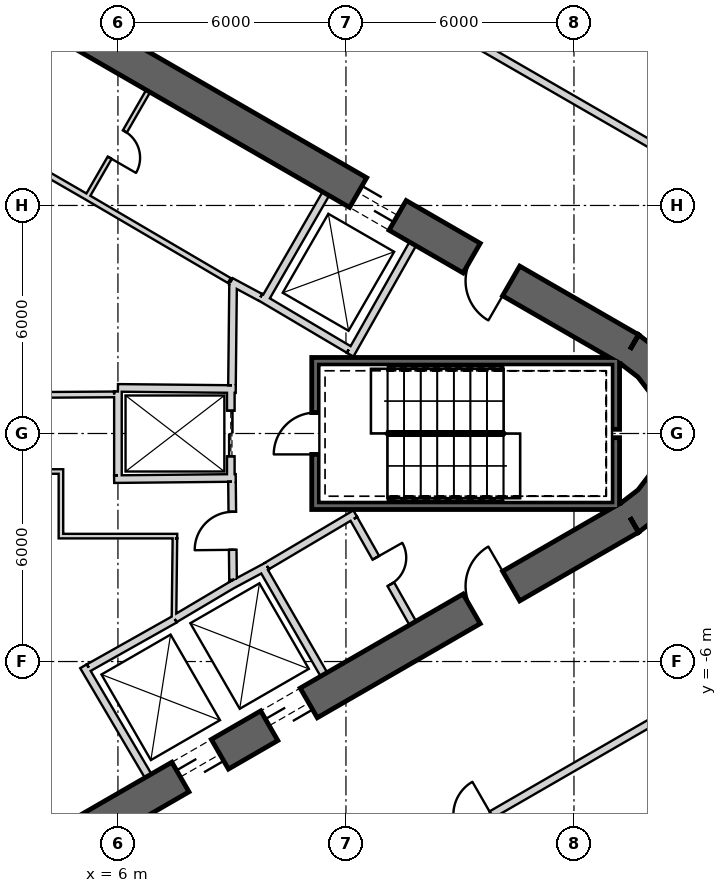
"""IFC4 building model, lengths in metres.
Left out: names, types, materials, properties, quantities, classifications, styles, units other than length and angle.
Written with IfcOpenShell. Run it as: python <this file> out.ifc"""

import sys

from ifc_helpers import new_model, si_unit, direction, frame, frame_2d, origin, place, context, subcontext, project, spatial, polyline, rectangle, outline, extrude, element, fill, save


model = new_model("IFC4")
c1 = context("Model", 3, precision=1e-05, world=origin(), true_north=direction((0.0, 1.0)))
c2 = subcontext(c1, "Body", "Model", "MODEL_VIEW")
j1 = project(units=[si_unit("LENGTHUNIT", "METRE"), si_unit("PLANEANGLEUNIT", "RADIAN")], contexts=[c1])
p1 = place(None, origin())
s1 = spatial("IfcSite", under=j1, at=p1, CompositionType="ELEMENT")
p2 = place(p1, origin())
s2 = spatial("IfcBuilding", under=s1, at=p2, CompositionType="ELEMENT")
p3 = place(p2, frame((0.0, 0.0, 392.3)))
s3 = spatial("IfcBuildingStorey", under=s2, at=p3, CompositionType="ELEMENT", Elevation=392.3)
p4 = place(p3, frame((19.475, 2.208, 0.0), z_axis=(0.0, 0.0, 1.0), x_axis=(-0.866028369851, 0.499994862586, 0.0)))
e1 = element("IfcWall", 1, at=p4, inside=s3, PredefinedType="SHEAR", context=c2, shape_type="SweptSolid", body=[
    extrude(rectangle(XDim=31.523, YDim=0.9, at=frame_2d((15.762, 0.0))), origin(), (0.0, 0.0, 1.0), 6.0),
])
p5 = place(p4, frame((7.062, 0.0, 0.0)))
e2 = element("IfcOpeningElement", 2, at=p5, cuts=e1, PredefinedType="OPENING", context=c2, shape_type="SweptSolid", body=[
    extrude(rectangle(XDim=1.2, YDim=2.4, at=frame_2d((0.6, 1.2))), frame((0.0, 0.46, 0.0), z_axis=(0.0, -1.0, 0.0), x_axis=(1.0, 0.0, 0.0)), (0.0, 0.0, 1.0), 0.92),
])
p6 = place(p4, frame((3.612, 0.0, 0.0)))
e3 = element("IfcOpeningElement", 3, at=p6, cuts=e1, PredefinedType="OPENING", context=c2, shape_type="SweptSolid", body=[
    extrude(rectangle(XDim=1.2, YDim=2.4, at=frame_2d((0.6, 1.2))), frame((0.0, 0.46, 0.0), z_axis=(0.0, -1.0, 0.0), x_axis=(1.0, 0.0, 0.0)), (0.0, 0.0, 1.0), 0.92),
])
p7 = place(p4, frame((26.712, 0.0, 0.0)))
e4 = element("IfcOpeningElement", 4, at=p7, cuts=e1, PredefinedType="OPENING", context=c2, shape_type="SweptSolid", body=[
    extrude(rectangle(XDim=1.2, YDim=2.4, at=frame_2d((0.6, 1.2))), frame((0.0, 0.46, 0.0), z_axis=(0.0, -1.0, 0.0), x_axis=(1.0, 0.0, 0.0)), (0.0, 0.0, 1.0), 0.92),
])
p8 = place(p3, frame((-7.825, -17.97, 0.0), z_axis=(0.0, 0.0, 1.0), x_axis=(0.866028369851, 0.499994862586, 0.0)))
e5 = element("IfcWall", 5, at=p8, inside=s3, PredefinedType="SHEAR", context=c2, shape_type="SweptSolid", body=[
    extrude(rectangle(XDim=31.523, YDim=0.9, at=frame_2d((15.762, 0.0))), origin(), (0.0, 0.0, 1.0), 6.0),
])
p9 = place(p8, frame((7.062, 0.0, 0.0)))
e6 = element("IfcOpeningElement", 6, at=p9, cuts=e5, PredefinedType="OPENING", context=c2, shape_type="SweptSolid", body=[
    extrude(rectangle(XDim=1.2, YDim=2.4, at=frame_2d((0.6, 1.2))), frame((0.0, 0.46, 0.0), z_axis=(0.0, -1.0, 0.0), x_axis=(1.0, 0.0, 0.0)), (0.0, 0.0, 1.0), 0.92),
])
p10 = place(p8, frame((9.762, 0.0, 0.0)))
e7 = element("IfcOpeningElement", 7, at=p10, cuts=e5, PredefinedType="OPENING", context=c2, shape_type="SweptSolid", body=[
    extrude(rectangle(XDim=1.2, YDim=2.4, at=frame_2d((0.6, 1.2))), frame((0.0, 0.46, 0.0), z_axis=(0.0, -1.0, 0.0), x_axis=(1.0, 0.0, 0.0)), (0.0, 0.0, 1.0), 0.92),
])
p11 = place(p8, frame((17.862, 0.0, 0.0)))
e8 = element("IfcOpeningElement", 8, at=p11, cuts=e5, PredefinedType="OPENING", context=c2, shape_type="SweptSolid", body=[
    extrude(rectangle(XDim=1.2, YDim=2.4, at=frame_2d((0.6, 1.2))), frame((0.0, 0.46, 0.0), z_axis=(0.0, -1.0, 0.0), x_axis=(1.0, 0.0, 0.0)), (0.0, 0.0, 1.0), 0.92),
])
p12 = place(p8, frame((20.562, 0.0, 0.0)))
e9 = element("IfcOpeningElement", 9, at=p12, cuts=e5, PredefinedType="OPENING", context=c2, shape_type="SweptSolid", body=[
    extrude(rectangle(XDim=1.2, YDim=2.4, at=frame_2d((0.6, 1.2))), frame((0.0, 0.46, 0.0), z_axis=(0.0, -1.0, 0.0), x_axis=(1.0, 0.0, 0.0)), (0.0, 0.0, 1.0), 0.92),
])
p13 = place(p8, frame((26.712, 0.0, 0.0)))
e10 = element("IfcOpeningElement", 10, at=p13, cuts=e5, PredefinedType="OPENING", context=c2, shape_type="SweptSolid", body=[
    extrude(rectangle(XDim=1.2, YDim=2.4, at=frame_2d((0.6, 1.2))), frame((0.0, 0.46, 0.0), z_axis=(0.0, -1.0, 0.0), x_axis=(1.0, 0.0, 0.0)), (0.0, 0.0, 1.0), 0.92),
])
p14 = place(p8, frame((3.612, 0.0, 0.0)))
e11 = element("IfcOpeningElement", 11, at=p14, cuts=e5, PredefinedType="OPENING", context=c2, shape_type="SweptSolid", body=[
    extrude(rectangle(XDim=1.2, YDim=2.4, at=frame_2d((0.6, 1.2))), frame((0.0, 0.46, 0.0), z_axis=(0.0, -1.0, 0.0), x_axis=(1.0, 0.0, 0.0)), (0.0, 0.0, 1.0), 0.92),
])
p15 = place(p3, origin())
e12 = element("IfcWall", 12, at=p15, inside=s3, PredefinedType="SHEAR", context=c2, shape_type="SweptSolid", body=[
    extrude(outline(polyline([(19.7, -2.598), (20.321, -2.121), (20.798, -1.5), (21.098, -0.777), (21.2, 0.0), (21.098, 0.777), (20.798, 1.5), (20.321, 2.121), (19.7, 2.598), (19.25, 1.819), (19.685, 1.485), (20.019, 1.05), (20.229, 0.543), (20.3, 0.0), (20.229, -0.543), (20.019, -1.05), (19.685, -1.485), (19.25, -1.819), (19.7, -2.598)])), origin(), (0.0, 0.0, 1.0), 6.0),
])
p16 = place(p3, frame((9.847, 3.495, 0.0), z_axis=(0.0, 0.0, 1.0), x_axis=(0.499984717929, 0.866034226713, 0.0)))
e13 = element("IfcWall", 13, at=p16, inside=s3, PredefinedType="PLUMBINGWALL", context=c2, shape_type="SweptSolid", body=[
    extrude(rectangle(XDim=3.25, YDim=0.2, at=frame_2d((1.625, 0.0))), origin(), (0.0, 0.0, 1.0), 5.7),
])
p17 = place(p3, frame((12.11, 2.073, 0.0), z_axis=(0.0, 0.0, 1.0), x_axis=(0.49196600604, 0.870614408852, 0.0)))
e14 = element("IfcWall", 14, at=p17, inside=s3, PredefinedType="PLUMBINGWALL", context=c2, shape_type="SweptSolid", body=[
    extrude(rectangle(XDim=3.35, YDim=0.2, at=frame_2d((1.675, 0.0))), origin(), (0.0, 0.0, 1.0), 5.7),
])
p18 = place(p3, frame((12.073, 2.211, 0.0), z_axis=(0.0, 0.0, 1.0), x_axis=(-0.860414880418, 0.509594185166, 0.0)))
e15 = element("IfcWall", 15, at=p18, inside=s3, PredefinedType="PLUMBINGWALL", context=c2, shape_type="SweptSolid", body=[
    extrude(rectangle(XDim=2.7, YDim=0.2, at=frame_2d((1.35, 0.0))), origin(), (0.0, 0.0, 1.0), 5.7),
])
p19 = place(p3, frame((6.795, -9.01, 0.0), z_axis=(0.0, 0.0, 1.0), x_axis=(-0.507997497166, 0.861358544901, 0.0)))
e16 = element("IfcWall", 16, at=p19, inside=s3, PredefinedType="PLUMBINGWALL", context=c2, shape_type="SweptSolid", body=[
    extrude(rectangle(XDim=3.35, YDim=0.2, at=frame_2d((1.675, 0.0))), origin(), (0.0, 0.0, 1.0), 5.7),
])
p20 = place(p3, frame((5.231, -6.161, 0.0), z_axis=(0.0, 0.0, 1.0), x_axis=(0.871540428464, 0.4903236498, 0.0)))
e17 = element("IfcWall", 17, at=p20, inside=s3, PredefinedType="PLUMBINGWALL", context=c2, shape_type="SweptSolid", body=[
    extrude(rectangle(XDim=2.6, YDim=0.2, at=frame_2d((1.3, 0.0))), origin(), (0.0, 0.0, 1.0), 5.7),
])
p21 = place(p3, frame((9.795, -3.525, 0.0), z_axis=(0.0, 0.0, 1.0), x_axis=(0.499984717929, -0.866034226713, 0.0)))
e18 = element("IfcWall", 18, at=p21, inside=s3, PredefinedType="PLUMBINGWALL", context=c2, shape_type="SweptSolid", body=[
    extrude(rectangle(XDim=3.25, YDim=0.2, at=frame_2d((1.625, 0.0))), origin(), (0.0, 0.0, 1.0), 5.7),
])
p22 = place(p3, frame((8.974, -3.999, 0.0), z_axis=(0.0, 0.0, 1.0), x_axis=(0.880907015104, 0.473289373154, 0.0)))
e19 = element("IfcWall", 19, at=p22, inside=s3, PredefinedType="PLUMBINGWALL", context=c2, shape_type="SweptSolid", body=[
    extrude(rectangle(XDim=1.078, YDim=0.2, at=frame_2d((0.539, 0.0))), origin(), (0.0, 0.0, 1.0), 5.7),
])
p23 = place(p3, frame((7.493, -4.878, 0.0), z_axis=(0.0, 0.0, 1.0), x_axis=(0.859981807212, 0.510324691999, 0.0)))
e20 = element("IfcWall", 20, at=p23, inside=s3, PredefinedType="PLUMBINGWALL", context=c2, shape_type="SweptSolid", body=[
    extrude(rectangle(XDim=1.845, YDim=0.2, at=frame_2d((0.922, 0.0))), origin(), (0.0, 0.0, 1.0), 5.7),
])
p24 = place(p3, frame((19.2, 1.9, -0.35), z_axis=(0.0, 0.0, 1.0), x_axis=(-1.0, 0.0, 0.0)))
e21 = element("IfcWall", 21, at=p24, inside=s3, PredefinedType="SHEAR", context=c2, shape_type="SweptSolid", body=[
    extrude(rectangle(XDim=8.1, YDim=0.2, at=frame_2d((4.05, 0.0))), origin(), (0.0, 0.0, 1.0), 6.05),
])
p25 = place(p3, frame((19.1, -2.0, -0.35), z_axis=(0.0, 0.0, 1.0), x_axis=(0.0, 1.0, 0.0)))
e22 = element("IfcWall", 22, at=p25, inside=s3, PredefinedType="SHEAR", context=c2, shape_type="SweptSolid", body=[
    extrude(rectangle(XDim=1.89, YDim=0.2, at=frame_2d((0.945, 0.0))), origin(), (0.0, 0.0, 1.0), 6.05),
])
p26 = place(p3, frame((19.1, 0.11, -0.35), z_axis=(0.0, 0.0, 1.0), x_axis=(0.0, 1.0, 0.0)))
e23 = element("IfcWall", 23, at=p26, inside=s3, PredefinedType="SHEAR", context=c2, shape_type="SweptSolid", body=[
    extrude(rectangle(XDim=1.69, YDim=0.2, at=frame_2d((0.845, 0.0))), origin(), (0.0, 0.0, 1.0), 6.05),
])
p27 = place(p3, frame((11.1, -1.9, -0.35), z_axis=(0.0, 0.0, 1.0), x_axis=(1.0, 0.0, 0.0)))
e24 = element("IfcWall", 24, at=p27, inside=s3, PredefinedType="SHEAR", context=c2, shape_type="SweptSolid", body=[
    extrude(rectangle(XDim=7.9, YDim=0.2, at=frame_2d((3.95, 0.0))), origin(), (0.0, 0.0, 1.0), 6.05),
])
p28 = place(p3, frame((11.2, -1.8, -0.35), z_axis=(0.0, 0.0, 1.0), x_axis=(0.0, 1.0, 0.0)))
e25 = element("IfcWall", 25, at=p28, inside=s3, PredefinedType="SHEAR", context=c2, shape_type="SweptSolid", body=[
    extrude(rectangle(XDim=3.6, YDim=0.2, at=frame_2d((1.8, 0.0))), origin(), (0.0, 0.0, 1.0), 6.05),
])
p29 = place(p28, frame((1.25, 0.0, 0.35)))
e26 = element("IfcOpeningElement", 26, at=p29, cuts=e25, PredefinedType="OPENING", context=c2, shape_type="SweptSolid", body=[
    extrude(rectangle(XDim=1.1, YDim=2.1, at=frame_2d((0.55, 1.05))), frame((0.0, 0.11, 0.0), z_axis=(0.0, -1.0, 0.0), x_axis=(1.0, 0.0, 0.0)), (0.0, 0.0, 1.0), 0.22),
])
p30 = place(p3, frame((8.97, 1.2, 0.0), z_axis=(0.0, 0.0, 1.0), x_axis=(0.0, -1.0, 0.0)))
e27 = element("IfcWall", 27, at=p30, inside=s3, PredefinedType="PLUMBINGWALL", context=c2, shape_type="SweptSolid", body=[
    extrude(rectangle(XDim=2.4, YDim=0.2, at=frame_2d((1.2, 0.0))), origin(), (0.0, 0.0, 1.0), 5.7),
])
p31 = place(p30, frame((0.6, 0.0, 0.0)))
e28 = element("IfcOpeningElement", 28, at=p31, cuts=e27, PredefinedType="OPENING", context=c2, shape_type="SweptSolid", body=[
    extrude(rectangle(XDim=1.2, YDim=2.4, at=frame_2d((0.6, 1.2))), frame((0.0, 0.11, 0.0), z_axis=(0.0, -1.0, 0.0), x_axis=(1.0, 0.0, 0.0)), (0.0, 0.0, 1.0), 0.22),
])
p32 = place(p3, frame((6.0, 1.2, 0.0), z_axis=(0.0, 0.0, 1.0), x_axis=(0.999949988, -0.010001074852, 0.0)))
e29 = element("IfcWall", 29, at=p32, inside=s3, PredefinedType="PLUMBINGWALL", context=c2, shape_type="SweptSolid", body=[
    extrude(rectangle(XDim=3.1, YDim=0.2, at=frame_2d((1.55, 0.0))), origin(), (0.0, 0.0, 1.0), 5.7),
])
p33 = place(p3, frame((5.9, -1.201, 0.0), z_axis=(0.0, 0.0, 1.0), x_axis=(0.999950064753, 0.009993397809, 0.0)))
e30 = element("IfcWall", 30, at=p33, inside=s3, PredefinedType="PLUMBINGWALL", context=c2, shape_type="SweptSolid", body=[
    extrude(rectangle(XDim=3.2, YDim=0.2, at=frame_2d((1.6, 0.0))), origin(), (0.0, 0.0, 1.0), 5.7),
])
p34 = place(p3, frame((6.0, -1.1, 0.0), z_axis=(0.0, 0.0, 1.0), x_axis=(0.0, 1.0, 0.0)))
e31 = element("IfcWall", 31, at=p34, inside=s3, PredefinedType="PLUMBINGWALL", context=c2, shape_type="SweptSolid", body=[
    extrude(rectangle(XDim=2.205, YDim=0.2, at=frame_2d((1.102, 0.0))), origin(), (0.0, 0.0, 1.0), 5.7),
])
p35 = place(p3, frame((6.795, 9.01, 0.0), z_axis=(0.0, 0.0, 1.0), x_axis=(-0.499984717929, -0.866034226713, 0.0)))
e32 = element("IfcWall", 32, at=p35, inside=s3, PredefinedType="PARTITIONING", context=c2, shape_type="SweptSolid", body=[
    extrude(rectangle(XDim=3.25, YDim=0.12, at=frame_2d((1.625, 0.0))), origin(), (0.0, 0.0, 1.0), 5.7),
])
p36 = place(p35, frame((1.225, 0.0, 0.0)))
e33 = element("IfcOpeningElement", 33, at=p36, cuts=e32, PredefinedType="OPENING", context=c2, shape_type="SweptSolid", body=[
    extrude(rectangle(XDim=0.8, YDim=2.1, at=frame_2d((0.4, 1.05))), frame((0.0, 0.07, 0.0), z_axis=(0.0, -1.0, 0.0), x_axis=(1.0, 0.0, 0.0)), (0.0, 0.0, 1.0), 0.14),
])
p37 = place(p3, frame((8.974, 3.999, 0.0), z_axis=(0.0, 0.0, 1.0), x_axis=(0.880917147855, -0.473270513147, 0.0)))
e34 = element("IfcWall", 34, at=p37, inside=s3, PredefinedType="PARTITIONING", context=c2, shape_type="SweptSolid", body=[
    extrude(rectangle(XDim=0.878, YDim=0.2, at=frame_2d((0.439, 0.0))), origin(), (0.0, 0.0, 1.0), 5.7),
])
p38 = place(p3, frame((8.931, 4.025, 0.0), z_axis=(0.0, 0.0, 1.0), x_axis=(-0.862666884027, 0.505772525157, 0.0)))
e35 = element("IfcWall", 35, at=p38, inside=s3, PredefinedType="PLUMBINGWALL", context=c2, shape_type="SweptSolid", body=[
    extrude(rectangle(XDim=4.372, YDim=0.15, at=frame_2d((2.186, 0.0))), origin(), (0.0, 0.0, 1.0), 5.7),
])
p39 = place(p3, frame((5.159, 6.236, 0.0), z_axis=(0.0, 0.0, 1.0), x_axis=(-0.866028230842, 0.499995103361, 0.0)))
e36 = element("IfcWall", 36, at=p39, inside=s3, PredefinedType="PLUMBINGWALL", context=c2, shape_type="SweptSolid", body=[
    extrude(rectangle(XDim=5.4, YDim=0.15, at=frame_2d((2.7, 0.0))), origin(), (0.0, 0.0, 1.0), 5.7),
])
p40 = place(p39, frame((2.3, 0.0, 0.0)))
e37 = element("IfcOpeningElement", 37, at=p40, cuts=e36, PredefinedType="OPENING", context=c2, shape_type="SweptSolid", body=[
    extrude(rectangle(XDim=0.8, YDim=2.1, at=frame_2d((0.4, 1.05))), frame((0.0, 0.085, 0.0), z_axis=(0.0, -1.0, 0.0), x_axis=(1.0, 0.0, 0.0)), (0.0, 0.0, 1.0), 0.17),
])
p41 = place(p3, frame((12.245, -2.109, 0.0), z_axis=(0.0, 0.0, 1.0), x_axis=(-0.860414880418, -0.509594185166, 0.0)))
e38 = element("IfcWall", 38, at=p41, inside=s3, PredefinedType="PARTITIONING", context=c2, shape_type="SweptSolid", body=[
    extrude(rectangle(XDim=2.7, YDim=0.2, at=frame_2d((1.35, 0.0))), origin(), (0.0, 0.0, 1.0), 5.7),
])
p42 = place(p3, frame((13.758, -4.99, 0.0), z_axis=(0.0, 0.0, 1.0), x_axis=(-0.491993409184, 0.87059892334, 0.0)))
e39 = element("IfcWall", 39, at=p42, inside=s3, PredefinedType="PARTITIONING", context=c2, shape_type="SweptSolid", body=[
    extrude(rectangle(XDim=3.15, YDim=0.2, at=frame_2d((1.575, 0.0))), origin(), (0.0, 0.0, 1.0), 5.7),
])
p43 = place(p42, frame((1.175, 0.0, 0.0)))
e40 = element("IfcOpeningElement", 40, at=p43, cuts=e39, PredefinedType="OPENING", context=c2, shape_type="SweptSolid", body=[
    extrude(rectangle(XDim=0.8, YDim=2.1, at=frame_2d((0.4, 1.05))), frame((0.0, 0.11, 0.0), z_axis=(0.0, -1.0, 0.0), x_axis=(1.0, 0.0, 0.0)), (0.0, 0.0, 1.0), 0.22),
])
p44 = place(p3, frame((9.001, 1.27, 0.0), z_axis=(0.0, 0.0, 1.0), x_axis=(0.01074821465, 0.999942236273, 0.0)))
e41 = element("IfcWall", 41, at=p44, inside=s3, PredefinedType="PARTITIONING", context=c2, shape_type="SweptSolid", body=[
    extrude(rectangle(XDim=2.726, YDim=0.2, at=frame_2d((1.363, 0.0))), origin(), (0.0, 0.0, 1.0), 5.7),
])
p45 = place(p3, frame((9.029, -3.851, 0.0), z_axis=(0.0, 0.0, 1.0), x_axis=(-0.010783593937, 0.99994185536, 0.0)))
e42 = element("IfcWall", 42, at=p45, inside=s3, PredefinedType="PARTITIONING", context=c2, shape_type="SweptSolid", body=[
    extrude(rectangle(XDim=2.581, YDim=0.2, at=frame_2d((1.291, 0.0))), origin(), (0.0, 0.0, 1.0), 5.7),
])
p46 = place(p45, frame((0.791, 0.0, 0.0)))
e43 = element("IfcOpeningElement", 43, at=p46, cuts=e42, PredefinedType="OPENING", context=c2, shape_type="SweptSolid", body=[
    extrude(rectangle(XDim=1.0, YDim=2.1, at=frame_2d((0.5, 1.05))), frame((0.0, 0.11, 0.0), z_axis=(0.0, -1.0, 0.0), x_axis=(1.0, 0.0, 0.0)), (0.0, 0.0, 1.0), 0.22),
])
p47 = place(p3, frame((1.518, 0.999, 0.0), z_axis=(0.0, 0.0, 1.0), x_axis=(0.999976903524, 0.006796500403, 0.0)))
e44 = element("IfcWall", 44, at=p47, inside=s3, PredefinedType="PLUMBINGWALL", context=c2, shape_type="SweptSolid", body=[
    extrude(rectangle(XDim=4.382, YDim=0.15, at=frame_2d((2.191, 0.0))), origin(), (0.0, 0.0, 1.0), 5.7),
])
p48 = place(p47, frame((1.855, 0.0, 0.0)))
e45 = element("IfcOpeningElement", 45, at=p48, cuts=e44, PredefinedType="OPENING", context=c2, shape_type="SweptSolid", body=[
    extrude(rectangle(XDim=0.8, YDim=2.1, at=frame_2d((0.4, 1.05))), frame((0.0, 0.085, 0.0), z_axis=(0.0, -1.0, 0.0), x_axis=(1.0, 0.0, 0.0)), (0.0, 0.0, 1.0), 0.17),
])
p49 = place(p3, frame((4.56, -1.0, 0.0), z_axis=(0.0, 0.0, 1.0), x_axis=(-1.0, 0.0, 0.0)))
e46 = element("IfcWall", 46, at=p49, inside=s3, PredefinedType="PARTITIONING", context=c2, shape_type="SweptSolid", body=[
    extrude(rectangle(XDim=2.896, YDim=0.12, at=frame_2d((1.448, 0.0))), origin(), (0.0, 0.0, 1.0), 5.7),
])
p50 = place(p3, frame((4.5, -2.76, 0.0), z_axis=(0.0, 0.0, 1.0), x_axis=(0.0, 1.0, 0.0)))
e47 = element("IfcWall", 47, at=p50, inside=s3, PredefinedType="PARTITIONING", context=c2, shape_type="SweptSolid", body=[
    extrude(rectangle(XDim=1.7, YDim=0.12, at=frame_2d((0.85, 0.0))), origin(), (0.0, 0.0, 1.0), 5.7),
])
p51 = place(p3, frame((7.56, -2.7, 0.0), z_axis=(0.0, 0.0, 1.0), x_axis=(-1.0, 0.0, 0.0)))
e48 = element("IfcWall", 48, at=p51, inside=s3, PredefinedType="PARTITIONING", context=c2, shape_type="SweptSolid", body=[
    extrude(rectangle(XDim=3.0, YDim=0.12, at=frame_2d((1.5, 0.0))), origin(), (0.0, 0.0, 1.0), 5.7),
])
p52 = place(p3, frame((7.475, -4.865, 0.0), z_axis=(0.0, 0.0, 1.0), x_axis=(0.011716133148, 0.999931363757, 0.0)))
e49 = element("IfcWall", 49, at=p52, inside=s3, PredefinedType="PARTITIONING", context=c2, shape_type="SweptSolid", body=[
    extrude(rectangle(XDim=2.105, YDim=0.12, at=frame_2d((1.052, 0.0))), origin(), (0.0, 0.0, 1.0), 5.7),
])
p53 = place(p3, frame((22.792, 6.009, 0.0), z_axis=(0.0, 0.0, 1.0), x_axis=(-0.866028288731, 0.499995003092, 0.0)))
e50 = element("IfcWall", 50, at=p53, inside=s3, PredefinedType="PARTITIONING", context=c2, shape_type="SweptSolid", body=[
    extrude(rectangle(XDim=23.262, YDim=0.2, at=frame_2d((11.631, 0.0))), origin(), (0.0, 0.0, 1.0), 5.07),
])
p54 = place(p53, frame((11.1, 0.0, 0.0)))
e51 = element("IfcOpeningElement", 51, at=p54, cuts=e50, PredefinedType="OPENING", context=c2, shape_type="SweptSolid", body=[
    extrude(rectangle(XDim=1.0, YDim=2.1, at=frame_2d((0.5, 1.05))), frame((0.0, 0.11, 0.0), z_axis=(0.0, -1.0, 0.0), x_axis=(1.0, 0.0, 0.0)), (0.0, 0.0, 1.0), 0.22),
])
p55 = place(p3, frame((7.984, -14.559, 0.0), z_axis=(0.0, 0.0, 1.0), x_axis=(0.866028009752, 0.499995486305, 0.0)))
e52 = element("IfcWall", 52, at=p55, inside=s3, PredefinedType="PARTITIONING", context=c2, shape_type="SweptSolid", body=[
    extrude(rectangle(XDim=16.9, YDim=0.2, at=frame_2d((8.45, 0.0))), origin(), (0.0, 0.0, 1.0), 5.07),
])
p56 = place(p55, frame((8.056, 0.0, 0.0)))
e53 = element("IfcOpeningElement", 53, at=p56, cuts=e52, PredefinedType="OPENING", context=c2, shape_type="SweptSolid", body=[
    extrude(rectangle(XDim=1.0, YDim=2.1, at=frame_2d((0.5, 1.05))), frame((0.0, 0.11, 0.0), z_axis=(0.0, -1.0, 0.0), x_axis=(1.0, 0.0, 0.0)), (0.0, 0.0, 1.0), 0.22),
])
p57 = place(p29, origin())
e54 = element("IfcDoor", 54, at=p57, inside=s3, OperationType="SINGLE_SWING_LEFT", PredefinedType="USERDEFINED", context=c2, shape_type="SweptSolid", body=[
    extrude(rectangle(XDim=1.1, YDim=2.1, at=frame_2d((0.55, 1.05))), frame((0.0, 0.025, 0.0), z_axis=(0.0, -1.0, 0.0), x_axis=(1.0, 0.0, 0.0)), (0.0, 0.0, 1.0), 0.05),
])
fill(e26, e54)
p58 = place(p46, origin())
e55 = element("IfcDoor", 55, at=p58, inside=s3, OperationType="SINGLE_SWING_LEFT", PredefinedType="USERDEFINED", context=c2, shape_type="SweptSolid", body=[
    extrude(rectangle(XDim=1.0, YDim=2.1, at=frame_2d((0.5, 1.05))), frame((0.0, 0.025, 0.0), z_axis=(0.0, -1.0, 0.0), x_axis=(1.0, 0.0, 0.0)), (0.0, 0.0, 1.0), 0.05),
])
fill(e43, e55)
p59 = place(p31, origin())
e56 = element("IfcDoor", 56, at=p59, inside=s3, OperationType="SLIDING_TO_LEFT", PredefinedType="USERDEFINED", context=c2, shape_type="SweptSolid", body=[
    extrude(rectangle(XDim=1.2, YDim=2.4, at=frame_2d((0.6, 1.2))), frame((0.0, 0.025, 0.0), z_axis=(0.0, -1.0, 0.0), x_axis=(1.0, 0.0, 0.0)), (0.0, 0.0, 1.0), 0.05),
])
fill(e28, e56)
p60 = place(p36, origin())
e57 = element("IfcDoor", 57, at=p60, inside=s3, OperationType="SINGLE_SWING_RIGHT", PredefinedType="USERDEFINED", context=c2, shape_type="SweptSolid", body=[
    extrude(rectangle(XDim=0.8, YDim=2.1, at=frame_2d((0.4, 1.05))), frame((0.0, 0.025, 0.0), z_axis=(0.0, -1.0, 0.0), x_axis=(1.0, 0.0, 0.0)), (0.0, 0.0, 1.0), 0.05),
])
fill(e33, e57)
p61 = place(p43, origin())
e58 = element("IfcDoor", 58, at=p61, inside=s3, OperationType="SINGLE_SWING_RIGHT", PredefinedType="USERDEFINED", context=c2, shape_type="SweptSolid", body=[
    extrude(rectangle(XDim=0.8, YDim=2.1, at=frame_2d((0.4, 1.05))), frame((0.0, 0.025, 0.0), z_axis=(0.0, -1.0, 0.0), x_axis=(1.0, 0.0, 0.0)), (0.0, 0.0, 1.0), 0.05),
])
fill(e40, e58)
p62 = place(p56, origin())
e59 = element("IfcDoor", 59, at=p62, inside=s3, OperationType="SINGLE_SWING_RIGHT", PredefinedType="USERDEFINED", context=c2, shape_type="SweptSolid", body=[
    extrude(rectangle(XDim=1.0, YDim=2.1, at=frame_2d((0.5, 1.05))), frame((0.0, 0.025, 0.0), z_axis=(0.0, -1.0, 0.0), x_axis=(1.0, 0.0, 0.0)), (0.0, 0.0, 1.0), 0.05),
])
fill(e53, e59)
p63 = place(p5, origin())
e60 = element("IfcDoor", 60, at=p63, inside=s3, OperationType="SLIDING_TO_LEFT", PredefinedType="USERDEFINED", context=c2, shape_type="SweptSolid", body=[
    extrude(rectangle(XDim=1.2, YDim=2.4, at=frame_2d((0.6, 1.2))), frame((0.0, 0.025, 0.0), z_axis=(0.0, -1.0, 0.0), x_axis=(1.0, 0.0, 0.0)), (0.0, 0.0, 1.0), 0.05),
])
fill(e2, e60)
p64 = place(p11, origin())
e61 = element("IfcDoor", 61, at=p64, inside=s3, OperationType="SLIDING_TO_LEFT", PredefinedType="USERDEFINED", context=c2, shape_type="SweptSolid", body=[
    extrude(rectangle(XDim=1.2, YDim=2.4, at=frame_2d((0.6, 1.2))), frame((0.0, 0.025, 0.0), z_axis=(0.0, -1.0, 0.0), x_axis=(1.0, 0.0, 0.0)), (0.0, 0.0, 1.0), 0.05),
])
fill(e8, e61)
p65 = place(p12, origin())
e62 = element("IfcDoor", 62, at=p65, inside=s3, OperationType="SLIDING_TO_LEFT", PredefinedType="USERDEFINED", context=c2, shape_type="SweptSolid", body=[
    extrude(rectangle(XDim=1.2, YDim=2.4, at=frame_2d((0.6, 1.2))), frame((0.0, 0.025, 0.0), z_axis=(0.0, -1.0, 0.0), x_axis=(1.0, 0.0, 0.0)), (0.0, 0.0, 1.0), 0.05),
])
fill(e9, e62)
p66 = place(p13, origin())
e63 = element("IfcDoor", 63, at=p66, inside=s3, OperationType="SINGLE_SWING_RIGHT", PredefinedType="USERDEFINED", context=c2, shape_type="SweptSolid", body=[
    extrude(rectangle(XDim=1.2, YDim=2.4, at=frame_2d((0.6, 1.2))), frame((0.0, 0.025, 0.0), z_axis=(0.0, -1.0, 0.0), x_axis=(1.0, 0.0, 0.0)), (0.0, 0.0, 1.0), 0.05),
])
fill(e10, e63)
p67 = place(p6, origin())
e64 = element("IfcDoor", 64, at=p67, inside=s3, OperationType="SINGLE_SWING_LEFT", PredefinedType="USERDEFINED", context=c2, shape_type="SweptSolid", body=[
    extrude(rectangle(XDim=1.2, YDim=2.4, at=frame_2d((0.6, 1.2))), frame((0.0, 0.025, 0.0), z_axis=(0.0, -1.0, 0.0), x_axis=(1.0, 0.0, 0.0)), (0.0, 0.0, 1.0), 0.05),
])
fill(e3, e64)
save(model, sys.argv[1])
